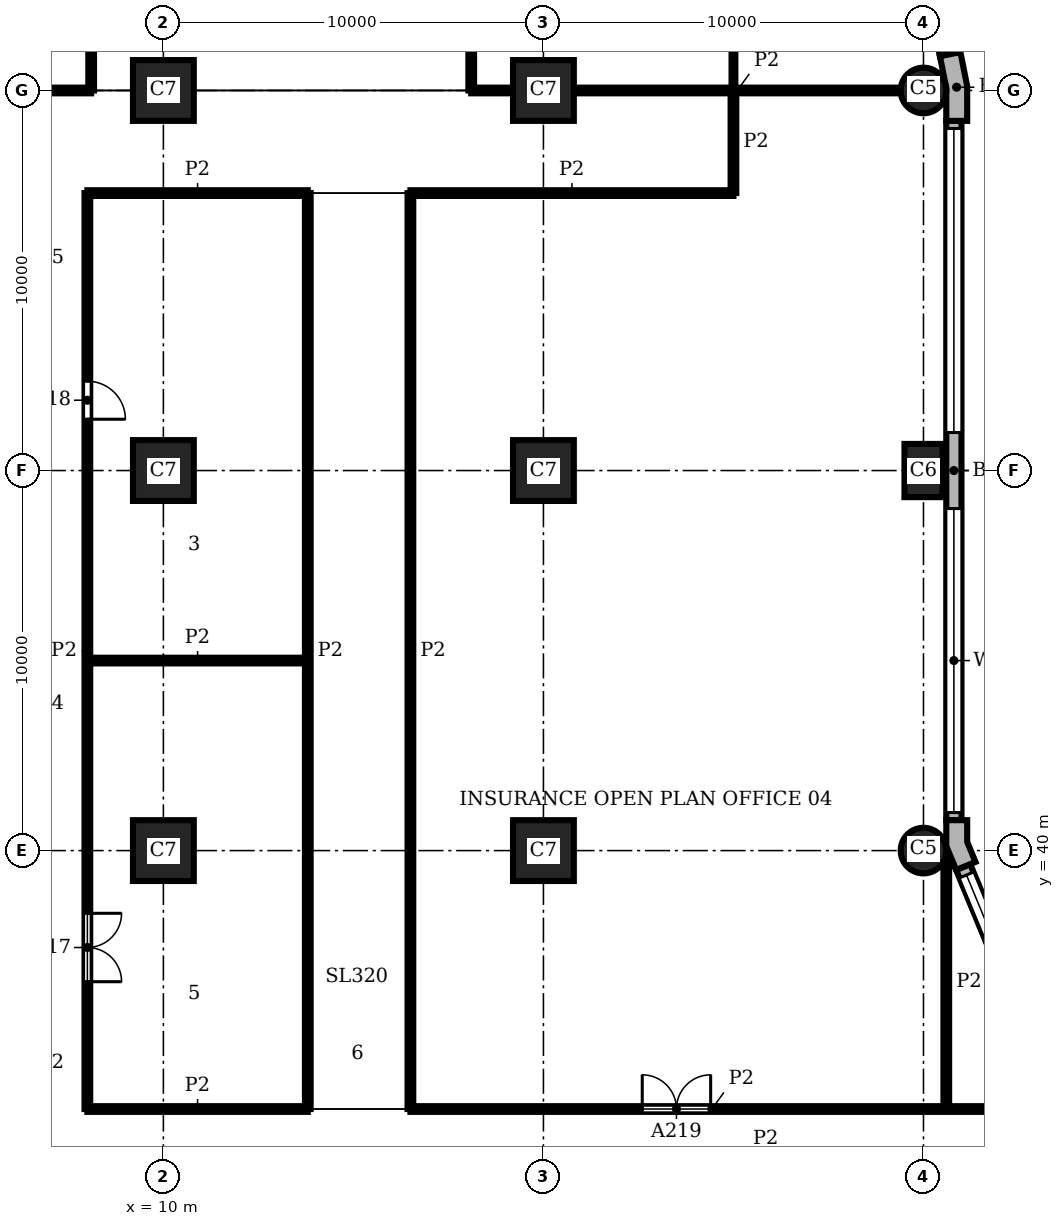
"""IFC4 building model, lengths in metres.
Left out: names, types, materials, properties, quantities, classifications, styles, units other than length and angle.
Written with IfcOpenShell. Run it as: python <this file> out.ifc"""

import sys

from ifc_helpers import new_model, si_unit, direction, frame, frame_2d, origin, origin_2d, place, context, subcontext, project, spatial, polyline, rectangle, circle, outline, extrude, element, fill, save


model = new_model("IFC4")
c1 = context("Model", 3, precision=1e-05, world=origin(), true_north=direction((0.0, 1.0)))
c2 = subcontext(c1, "Body", "Model", "MODEL_VIEW")
j1 = project(units=[si_unit("LENGTHUNIT", "METRE"), si_unit("PLANEANGLEUNIT", "RADIAN")], contexts=[c1])
p1 = place(None, origin())
s1 = spatial("IfcSite", under=j1, at=p1, CompositionType="ELEMENT")
p2 = place(p1, origin())
s2 = spatial("IfcBuilding", under=s1, at=p2, CompositionType="ELEMENT")
p3 = place(p2, frame((0.0, 0.0, 23.7)))
s3 = spatial("IfcBuildingStorey", under=s2, at=p3, CompositionType="ELEMENT", Elevation=23.7)
p4 = place(p3, frame((30.0, 40.0, 0.0), z_axis=(0.0, 0.0, 1.0), x_axis=(1.0, 0.0, 0.0)))
e1 = element("IfcColumn", 1, at=p4, inside=s3, PredefinedType="COLUMN", context=c2, shape_type="SweptSolid", body=[
    extrude(circle(Radius=0.6, at=origin_2d()), origin(), (0.0, 0.0, 1.0), 3.9),
])
p5 = place(p3, frame((30.0, 50.0, 0.0), z_axis=(0.0, 0.0, 1.0), x_axis=(0.0, 1.0, 0.0)))
e2 = element("IfcColumn", 2, at=p5, inside=s3, PredefinedType="COLUMN", context=c2, shape_type="SweptSolid", body=[
    extrude(rectangle(XDim=1.4, YDim=1.0, at=origin_2d()), origin(), (0.0, 0.0, 1.0), 3.9),
])
p6 = place(p3, frame((30.0, 60.0, 0.0), z_axis=(0.0, 0.0, 1.0), x_axis=(1.0, 0.0, 0.0)))
e3 = element("IfcColumn", 3, at=p6, inside=s3, PredefinedType="COLUMN", context=c2, shape_type="SweptSolid", body=[
    extrude(circle(Radius=0.6, at=origin_2d()), origin(), (0.0, 0.0, 1.0), 3.9),
])
for number, where, z_axis, x_axis in (
    (4, (10.0, 40.0, 0.0), (0.0, 0.0, 1.0), (1.0, 0.0, 0.0)),
    (5, (10.0, 50.0, 0.0), (0.0, 0.0, 1.0), (1.0, 0.0, 0.0)),
    (6, (10.0, 60.0, 0.0), (0.0, 0.0, 1.0), (1.0, 0.0, 0.0)),
    (7, (20.0, 40.0, 0.0), (0.0, 0.0, 1.0), (1.0, 0.0, 0.0)),
    (8, (20.0, 50.0, 0.0), (0.0, 0.0, 1.0), (1.0, 0.0, 0.0)),
    (9, (20.0, 60.0, 0.0), (0.0, 0.0, 1.0), (1.0, 0.0, 0.0)),
):
    element("IfcColumn", number, at=place(p3, frame(where, z_axis=z_axis, x_axis=x_axis)), inside=s3, PredefinedType="COLUMN", context=c2, shape_type="SweptSolid", body=[
        extrude(rectangle(XDim=1.6, YDim=1.6, at=origin_2d()), origin(), (0.0, 0.0, 1.0), 3.9),
    ])
p7 = place(p3, origin())
e10 = element("IfcWall", 10, at=p7, inside=s3, PredefinedType="SOLIDWALL", context=c2, shape_type="SweptSolid", body=[
    extrude(outline(polyline([(31.23, 39.644), (31.369, 39.701), (31.15, 40.229), (31.15, 40.8), (31.0, 40.8), (30.6, 40.8), (30.6, 40.119), (30.861, 39.49), (31.23, 39.644)])), origin(), (0.0, 0.0, 1.0), 3.9),
])
e11 = element("IfcWall", 11, at=p7, inside=s3, PredefinedType="SOLIDWALL", context=c2, shape_type="SweptSolid", body=[
    extrude(outline(polyline([(31.0, 59.2), (31.15, 59.2), (31.15, 60.113), (30.972, 61.009), (30.825, 60.98), (30.432, 60.902), (30.6, 60.059), (30.6, 59.2), (31.0, 59.2)])), origin(), (0.0, 0.0, 1.0), 3.9),
])
p8 = place(p3, frame((33.362, 33.974, 0.0), z_axis=(0.0, 0.0, 1.0), x_axis=(-0.382655745237, 0.923891000409, 0.0)))
e12 = element("IfcWall", 12, at=p8, inside=s3, PredefinedType="SOLIDWALL", context=c2, shape_type="SweptSolid", body=[
    extrude(rectangle(XDim=6.053, YDim=0.4, at=frame_2d((3.027, 0.0))), origin(), (0.0, 0.0, 1.0), 3.9),
])
p9 = place(p8, frame((0.227, 0.0, 0.9)))
e13 = element("IfcOpeningElement", 13, at=p9, cuts=e12, PredefinedType="OPENING", context=c2, shape_type="SweptSolid", body=[
    extrude(rectangle(XDim=5.6, YDim=2.35, at=frame_2d((2.8, 1.175))), frame((0.0, 0.21, 0.0), z_axis=(0.0, -1.0, 0.0), x_axis=(1.0, 0.0, 0.0)), (0.0, 0.0, 1.0), 0.42),
])
p10 = place(p3, frame((30.8, 40.8, 0.0), z_axis=(0.0, 0.0, 1.0), x_axis=(0.0, 1.0, 0.0)))
e14 = element("IfcWall", 14, at=p10, inside=s3, PredefinedType="SOLIDWALL", context=c2, shape_type="SweptSolid", body=[
    extrude(rectangle(XDim=18.4, YDim=0.4, at=frame_2d((9.2, 0.0))), origin(), (0.0, 0.0, 1.0), 3.9),
])
p11 = place(p10, frame((0.2, 0.0, 0.9)))
e15 = element("IfcOpeningElement", 15, at=p11, cuts=e14, PredefinedType="OPENING", context=c2, shape_type="SweptSolid", body=[
    extrude(rectangle(XDim=8.0, YDim=2.35, at=frame_2d((4.0, 1.175))), frame((0.0, 0.21, 0.0), z_axis=(0.0, -1.0, 0.0), x_axis=(1.0, 0.0, 0.0)), (0.0, 0.0, 1.0), 0.42),
])
p12 = place(p10, frame((10.2, 0.0, 0.9)))
e16 = element("IfcOpeningElement", 16, at=p12, cuts=e14, PredefinedType="OPENING", context=c2, shape_type="SweptSolid", body=[
    extrude(rectangle(XDim=8.0, YDim=2.35, at=frame_2d((4.0, 1.175))), frame((0.0, 0.21, 0.0), z_axis=(0.0, -1.0, 0.0), x_axis=(1.0, 0.0, 0.0)), (0.0, 0.0, 1.0), 0.42),
])
p13 = place(p3, frame((30.629, 60.941, 0.0), z_axis=(0.0, 0.0, 1.0), x_axis=(-0.195098533057, 0.98078364709, 0.0)))
e17 = element("IfcWall", 17, at=p13, inside=s3, PredefinedType="SOLIDWALL", context=c2, shape_type="SweptSolid", body=[
    extrude(rectangle(XDim=4.753, YDim=0.4, at=frame_2d((2.376, 0.0))), origin(), (0.0, 0.0, 1.0), 3.9),
])
p14 = place(p13, frame((0.226, 0.0, 0.9)))
e18 = element("IfcOpeningElement", 18, at=p14, cuts=e17, PredefinedType="OPENING", context=c2, shape_type="SweptSolid", body=[
    extrude(rectangle(XDim=4.3, YDim=2.35, at=frame_2d((2.15, 1.175))), frame((0.0, 0.21, 0.0), z_axis=(0.0, -1.0, 0.0), x_axis=(1.0, 0.0, 0.0)), (0.0, 0.0, 1.0), 0.42),
])
p15 = place(p3, frame((25.0, 60.0, 0.0), z_axis=(0.0, 0.0, 1.0), x_axis=(0.0, 1.0, 0.0)))
e19 = element("IfcWall", 19, at=p15, inside=s3, PredefinedType="PARTITIONING", context=c2, shape_type="SweptSolid", body=[
    extrude(rectangle(XDim=8.0, YDim=0.1, at=frame_2d((4.0, 0.0))), origin(), (0.0, 0.0, 1.0), 3.58),
])
p16 = place(p15, frame((2.85, 0.0, 0.0)))
e20 = element("IfcOpeningElement", 20, at=p16, cuts=e19, PredefinedType="OPENING", context=c2, shape_type="SweptSolid", body=[
    extrude(rectangle(XDim=0.9, YDim=2.1, at=frame_2d((0.45, 1.05))), frame((0.0, 0.06, 0.0), z_axis=(0.0, -1.0, 0.0), x_axis=(1.0, 0.0, 0.0)), (0.0, 0.0, 1.0), 0.12),
])
p17 = place(p3, frame((8.0, 33.2, 0.0), z_axis=(0.0, 0.0, 1.0), x_axis=(0.0, 1.0, 0.0)))
e21 = element("IfcWall", 21, at=p17, inside=s3, PredefinedType="PARTITIONING", context=c2, shape_type="SweptSolid", body=[
    extrude(rectangle(XDim=24.1, YDim=0.15, at=frame_2d((12.05, 0.0))), origin(), (0.0, 0.0, 1.0), 3.58),
])
p18 = place(p17, frame((3.35, 0.0, 0.0)))
e22 = element("IfcOpeningElement", 22, at=p18, cuts=e21, PredefinedType="OPENING", context=c2, shape_type="SweptSolid", body=[
    extrude(rectangle(XDim=1.8, YDim=2.1, at=frame_2d((0.9, 1.05))), frame((0.0, 0.085, 0.0), z_axis=(0.0, -1.0, 0.0), x_axis=(1.0, 0.0, 0.0)), (0.0, 0.0, 1.0), 0.17),
])
p19 = place(p17, frame((18.15, 0.0, 0.0)))
e23 = element("IfcOpeningElement", 23, at=p19, cuts=e21, PredefinedType="OPENING", context=c2, shape_type="SweptSolid", body=[
    extrude(rectangle(XDim=1.0, YDim=2.1, at=frame_2d((0.5, 1.05))), frame((0.0, 0.085, 0.0), z_axis=(0.0, -1.0, 0.0), x_axis=(1.0, 0.0, 0.0)), (0.0, 0.0, 1.0), 0.17),
])
p20 = place(p3, frame((8.1, 60.0, 0.0), z_axis=(0.0, 0.0, 1.0), x_axis=(0.0, 1.0, 0.0)))
e24 = element("IfcWall", 24, at=p20, inside=s3, PredefinedType="PARTITIONING", context=c2, shape_type="SweptSolid", body=[
    extrude(rectangle(XDim=6.4, YDim=0.15, at=frame_2d((3.2, 0.0))), origin(), (0.0, 0.0, 1.0), 3.58),
])
p21 = place(p20, frame((3.35, 0.0, 0.0)))
e25 = element("IfcOpeningElement", 25, at=p21, cuts=e24, PredefinedType="OPENING", context=c2, shape_type="SweptSolid", body=[
    extrude(rectangle(XDim=1.0, YDim=2.1, at=frame_2d((0.5, 1.05))), frame((0.0, 0.085, 0.0), z_axis=(0.0, -1.0, 0.0), x_axis=(1.0, 0.0, 0.0)), (0.0, 0.0, 1.0), 0.17),
])
for number, where, z_axis, x_axis in (
    (26, (13.8, 33.2, 0.0), (0.0, 0.0, 1.0), (0.0, 1.0, 0.0)),
    (27, (16.5, 33.2, 0.0), (0.0, 0.0, 1.0), (0.0, 1.0, 0.0)),
):
    element("IfcWall", number, at=place(p3, frame(where, z_axis=z_axis, x_axis=x_axis)), inside=s3, PredefinedType="PARTITIONING", context=c2, shape_type="SweptSolid", body=[
        extrude(rectangle(XDim=24.1, YDim=0.15, at=frame_2d((12.05, 0.0))), origin(), (0.0, 0.0, 1.0), 3.58),
    ])
p22 = place(p3, frame((18.1, 60.0, 0.0), z_axis=(0.0, 0.0, 1.0), x_axis=(0.0, 1.0, 0.0)))
e28 = element("IfcWall", 28, at=p22, inside=s3, PredefinedType="PARTITIONING", context=c2, shape_type="SweptSolid", body=[
    extrude(rectangle(XDim=6.4, YDim=0.15, at=frame_2d((3.2, 0.0))), origin(), (0.0, 0.0, 1.0), 3.58),
])
p23 = place(p22, frame((2.85, 0.0, 0.0)))
e29 = element("IfcOpeningElement", 29, at=p23, cuts=e28, PredefinedType="OPENING", context=c2, shape_type="SweptSolid", body=[
    extrude(rectangle(XDim=1.0, YDim=2.1, at=frame_2d((0.5, 1.05))), frame((0.0, 0.085, 0.0), z_axis=(0.0, -1.0, 0.0), x_axis=(1.0, 0.0, 0.0)), (0.0, 0.0, 1.0), 0.17),
])
p24 = place(p3, frame((25.0, 57.3, 0.0), z_axis=(0.0, 0.0, 1.0), x_axis=(0.0, 1.0, 0.0)))
e30 = element("IfcWall", 30, at=p24, inside=s3, PredefinedType="PARTITIONING", context=c2, shape_type="SweptSolid", body=[
    extrude(rectangle(XDim=2.7, YDim=0.15, at=frame_2d((1.35, 0.0))), origin(), (0.0, 0.0, 1.0), 3.58),
])
p25 = place(p3, frame((30.6, 33.2, 0.0), z_axis=(0.0, 0.0, 1.0), x_axis=(0.0, 1.0, 0.0)))
e31 = element("IfcWall", 31, at=p25, inside=s3, PredefinedType="PARTITIONING", context=c2, shape_type="SweptSolid", body=[
    extrude(rectangle(XDim=6.699, YDim=0.15, at=frame_2d((3.35, 0.0))), origin(), (0.0, 0.0, 1.0), 3.58),
])
p26 = place(p3, frame((8.0, 33.2, 0.0), z_axis=(0.0, 0.0, 1.0), x_axis=(1.0, 0.0, 0.0)))
e32 = element("IfcWall", 32, at=p26, inside=s3, PredefinedType="PARTITIONING", context=c2, shape_type="SweptSolid", body=[
    extrude(rectangle(XDim=5.8, YDim=0.15, at=frame_2d((2.9, 0.0))), origin(), (0.0, 0.0, 1.0), 3.58),
])
p27 = place(p3, frame((16.5, 33.2, 0.0), z_axis=(0.0, 0.0, 1.0), x_axis=(1.0, 0.0, 0.0)))
e33 = element("IfcWall", 33, at=p27, inside=s3, PredefinedType="PARTITIONING", context=c2, shape_type="SweptSolid", body=[
    extrude(rectangle(XDim=15.862, YDim=0.15, at=frame_2d((7.931, 0.0))), origin(), (0.0, 0.0, 1.0), 3.58),
])
p28 = place(p27, frame((6.1, 0.0, 0.0)))
e34 = element("IfcOpeningElement", 34, at=p28, cuts=e33, PredefinedType="OPENING", context=c2, shape_type="SweptSolid", body=[
    extrude(rectangle(XDim=1.8, YDim=2.1, at=frame_2d((0.9, 1.05))), frame((0.0, 0.085, 0.0), z_axis=(0.0, -1.0, 0.0), x_axis=(1.0, 0.0, 0.0)), (0.0, 0.0, 1.0), 0.17),
])
for number, where, z_axis, x_axis in (
    (35, (8.0, 45.0, 0.0), (0.0, 0.0, 1.0), (1.0, 0.0, 0.0)),
    (36, (8.0, 57.3, 0.0), (0.0, 0.0, 1.0), (1.0, 0.0, 0.0)),
):
    element("IfcWall", number, at=place(p3, frame(where, z_axis=z_axis, x_axis=x_axis)), inside=s3, PredefinedType="PARTITIONING", context=c2, shape_type="SweptSolid", body=[
        extrude(rectangle(XDim=5.8, YDim=0.15, at=frame_2d((2.9, 0.0))), origin(), (0.0, 0.0, 1.0), 3.58),
    ])
p29 = place(p3, frame((16.5, 57.3, 0.0), z_axis=(0.0, 0.0, 1.0), x_axis=(1.0, 0.0, 0.0)))
e37 = element("IfcWall", 37, at=p29, inside=s3, PredefinedType="PARTITIONING", context=c2, shape_type="SweptSolid", body=[
    extrude(rectangle(XDim=8.5, YDim=0.15, at=frame_2d((4.25, 0.0))), origin(), (0.0, 0.0, 1.0), 3.58),
])
p30 = place(p3, frame((0.6, 60.0, 0.0), z_axis=(0.0, 0.0, 1.0), x_axis=(1.0, 0.0, 0.0)))
e38 = element("IfcWall", 38, at=p30, inside=s3, PredefinedType="PARTITIONING", context=c2, shape_type="SweptSolid", body=[
    extrude(rectangle(XDim=7.5, YDim=0.15, at=frame_2d((3.75, 0.0))), origin(), (0.0, 0.0, 1.0), 3.58),
])
p31 = place(p3, frame((18.1, 60.0, 0.0), z_axis=(0.0, 0.0, 1.0), x_axis=(1.0, 0.0, 0.0)))
e39 = element("IfcWall", 39, at=p31, inside=s3, PredefinedType="PARTITIONING", context=c2, shape_type="SweptSolid", body=[
    extrude(rectangle(XDim=1.1, YDim=0.15, at=frame_2d((0.55, 0.0))), origin(), (0.0, 0.0, 1.0), 3.58),
])
p32 = place(p3, frame((20.8, 60.0, 0.0), z_axis=(0.0, 0.0, 1.0), x_axis=(1.0, 0.0, 0.0)))
e40 = element("IfcWall", 40, at=p32, inside=s3, PredefinedType="PARTITIONING", context=c2, shape_type="SweptSolid", body=[
    extrude(rectangle(XDim=8.6, YDim=0.15, at=frame_2d((4.3, 0.0))), origin(), (0.0, 0.0, 1.0), 3.58),
])
p33 = place(p9, origin())
e41 = element("IfcWindow", 41, at=p33, inside=s3, PartitioningType="SINGLE_PANEL", PredefinedType="WINDOW", context=c2, shape_type="SweptSolid", body=[
    extrude(rectangle(XDim=5.6, YDim=2.35, at=frame_2d((2.8, 1.175))), frame((0.0, 0.16, 0.0), z_axis=(0.0, -1.0, 0.0), x_axis=(1.0, 0.0, 0.0)), (0.0, 0.0, 1.0), 0.06),
])
fill(e13, e41)
p34 = place(p11, origin())
e42 = element("IfcWindow", 42, at=p34, inside=s3, PartitioningType="SINGLE_PANEL", PredefinedType="WINDOW", context=c2, shape_type="SweptSolid", body=[
    extrude(rectangle(XDim=8.0, YDim=2.35, at=frame_2d((4.0, 1.175))), frame((0.0, 0.16, 0.0), z_axis=(0.0, -1.0, 0.0), x_axis=(1.0, 0.0, 0.0)), (0.0, 0.0, 1.0), 0.06),
])
fill(e15, e42)
p35 = place(p12, origin())
e43 = element("IfcWindow", 43, at=p35, inside=s3, PartitioningType="SINGLE_PANEL", PredefinedType="WINDOW", context=c2, shape_type="SweptSolid", body=[
    extrude(rectangle(XDim=8.0, YDim=2.35, at=frame_2d((4.0, 1.175))), frame((0.0, 0.16, 0.0), z_axis=(0.0, -1.0, 0.0), x_axis=(1.0, 0.0, 0.0)), (0.0, 0.0, 1.0), 0.06),
])
fill(e16, e43)
p36 = place(p18, frame((1.8, 0.0, 0.0), z_axis=(0.0, 0.0, 1.0), x_axis=(-1.0, 0.0, 0.0)))
e44 = element("IfcDoor", 44, at=p36, inside=s3, OperationType="DOUBLE_DOOR_SINGLE_SWING", PredefinedType="DOOR", context=c2, shape_type="SweptSolid", body=[
    extrude(rectangle(XDim=1.8, YDim=2.1, at=frame_2d((0.9, 1.05))), frame((0.0, 0.025, 0.0), z_axis=(0.0, -1.0, 0.0), x_axis=(1.0, 0.0, 0.0)), (0.0, 0.0, 1.0), 0.05),
])
fill(e22, e44)
p37 = place(p19, frame((1.0, 0.0, 0.0), z_axis=(0.0, 0.0, 1.0), x_axis=(-1.0, 0.0, 0.0)))
e45 = element("IfcDoor", 45, at=p37, inside=s3, OperationType="SINGLE_SWING_RIGHT", PredefinedType="DOOR", context=c2, shape_type="SweptSolid", body=[
    extrude(rectangle(XDim=1.0, YDim=2.1, at=frame_2d((0.5, 1.05))), frame((0.0, 0.025, 0.0), z_axis=(0.0, -1.0, 0.0), x_axis=(1.0, 0.0, 0.0)), (0.0, 0.0, 1.0), 0.05),
])
fill(e23, e45)
p38 = place(p28, origin())
e46 = element("IfcDoor", 46, at=p38, inside=s3, OperationType="DOUBLE_DOOR_SINGLE_SWING", PredefinedType="DOOR", context=c2, shape_type="SweptSolid", body=[
    extrude(rectangle(XDim=1.8, YDim=2.1, at=frame_2d((0.9, 1.05))), frame((0.0, 0.025, 0.0), z_axis=(0.0, -1.0, 0.0), x_axis=(1.0, 0.0, 0.0)), (0.0, 0.0, 1.0), 0.05),
])
fill(e34, e46)
save(model, sys.argv[1])
